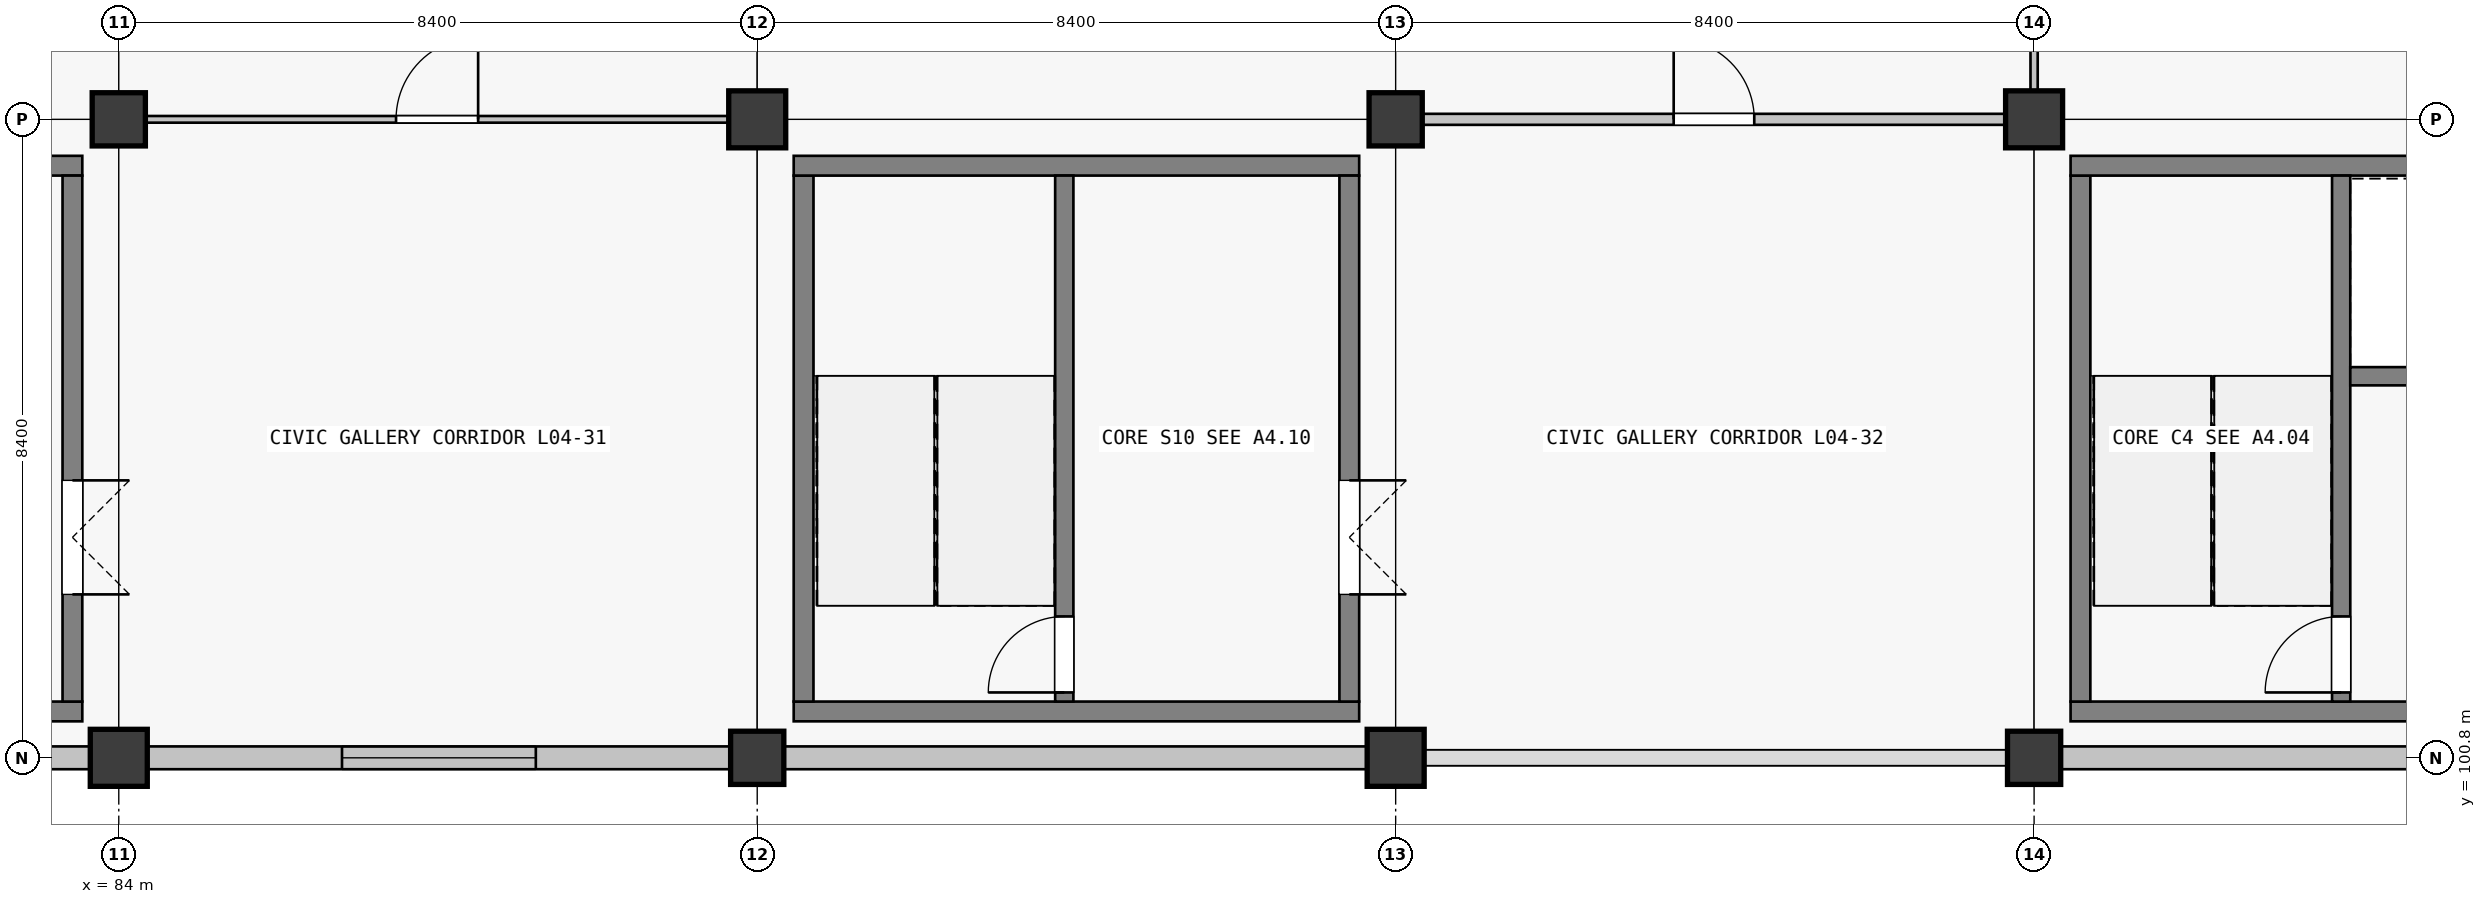
"""IFC4 building model, lengths in metres.
Left out: names, types, materials, properties, quantities, classifications, styles, units other than length and angle.
Written with IfcOpenShell. Run it as: python <this file> out.ifc"""

import sys

from ifc_helpers import new_model, si_unit, direction, frame, frame_2d, origin, origin_2d, place, context, subcontext, project, spatial, rectangle, extrude, element, fill, save


model = new_model("IFC4")
c1 = context("Model", 3, precision=1e-05, world=origin(), true_north=direction((0.0, 1.0)))
c2 = subcontext(c1, "Body", "Model", "MODEL_VIEW")
j1 = project(units=[si_unit("LENGTHUNIT", "METRE"), si_unit("PLANEANGLEUNIT", "RADIAN")], contexts=[c1])
p1 = place(None, origin())
s1 = spatial("IfcSite", under=j1, at=p1, CompositionType="ELEMENT")
p2 = place(p1, origin())
s2 = spatial("IfcBuilding", under=s1, at=p2, CompositionType="ELEMENT")
p3 = place(p2, frame((0.0, 0.0, 19.08)))
s3 = spatial("IfcBuildingStorey", under=s2, at=p3, CompositionType="ELEMENT", Elevation=19.08)
p4 = place(p3, frame((84.0, 100.8, 0.0), z_axis=(0.0, 0.0, 1.0), x_axis=(1.0, 0.0, 0.0)))
e1 = element("IfcColumn", 1, at=p4, inside=s3, PredefinedType="COLUMN", context=c2, shape_type="SweptSolid", body=[
    extrude(rectangle(XDim=0.75, YDim=0.75, at=origin_2d()), origin(), (0.0, 0.0, 1.0), 4.32),
])
for number, where, z_axis, x_axis in (
    (2, (84.0, 109.2, 0.0), (0.0, 0.0, 1.0), (1.0, 0.0, 0.0)),
    (3, (92.4, 100.8, 0.0), (0.0, 0.0, 1.0), (1.0, 0.0, 0.0)),
):
    element("IfcColumn", number, at=place(p3, frame(where, z_axis=z_axis, x_axis=x_axis)), inside=s3, PredefinedType="COLUMN", context=c2, shape_type="SweptSolid", body=[
        extrude(rectangle(XDim=0.7, YDim=0.7, at=origin_2d()), origin(), (0.0, 0.0, 1.0), 4.32),
    ])
for number, where, z_axis, x_axis in (
    (4, (92.4, 109.2, 0.0), (0.0, 0.0, 1.0), (1.0, 0.0, 0.0)),
    (5, (100.8, 100.8, 0.0), (0.0, 0.0, 1.0), (1.0, 0.0, 0.0)),
):
    element("IfcColumn", number, at=place(p3, frame(where, z_axis=z_axis, x_axis=x_axis)), inside=s3, PredefinedType="COLUMN", context=c2, shape_type="SweptSolid", body=[
        extrude(rectangle(XDim=0.75, YDim=0.75, at=origin_2d()), origin(), (0.0, 0.0, 1.0), 4.32),
    ])
for number, where, z_axis, x_axis in (
    (6, (100.8, 109.2, 0.0), (0.0, 0.0, 1.0), (1.0, 0.0, 0.0)),
    (7, (109.2, 100.8, 0.0), (0.0, 0.0, 1.0), (1.0, 0.0, 0.0)),
):
    element("IfcColumn", number, at=place(p3, frame(where, z_axis=z_axis, x_axis=x_axis)), inside=s3, PredefinedType="COLUMN", context=c2, shape_type="SweptSolid", body=[
        extrude(rectangle(XDim=0.7, YDim=0.7, at=origin_2d()), origin(), (0.0, 0.0, 1.0), 4.32),
    ])
p5 = place(p3, frame((109.2, 109.2, 0.0), z_axis=(0.0, 0.0, 1.0), x_axis=(1.0, 0.0, 0.0)))
e8 = element("IfcColumn", 8, at=p5, inside=s3, PredefinedType="COLUMN", context=c2, shape_type="SweptSolid", body=[
    extrude(rectangle(XDim=0.75, YDim=0.75, at=origin_2d()), origin(), (0.0, 0.0, 1.0), 4.32),
])
p6 = place(p3, frame((83.624, 100.8, 0.0), z_axis=(0.0, 0.0, 1.0), x_axis=(-1.0, 0.0, 0.0)))
e9 = element("IfcWall", 9, at=p6, inside=s3, PredefinedType="SOLIDWALL", context=c2, shape_type="SweptSolid", body=[
    extrude(rectangle(XDim=7.673, YDim=0.3, at=frame_2d((3.836, 0.0))), origin(), (0.0, 0.0, 1.0), 3.37),
])
p7 = place(p3, frame((92.049, 100.8, 0.0), z_axis=(0.0, 0.0, 1.0), x_axis=(-1.0, 0.0, 0.0)))
e10 = element("IfcWall", 10, at=p7, inside=s3, PredefinedType="SOLIDWALL", context=c2, shape_type="SweptSolid", body=[
    extrude(rectangle(XDim=7.673, YDim=0.3, at=frame_2d((3.836, 0.0))), origin(), (0.0, 0.0, 1.0), 3.37),
])
p8 = place(p7, frame((2.562, 0.0, 0.9)))
e11 = element("IfcOpeningElement", 11, at=p8, cuts=e10, PredefinedType="OPENING", context=c2, shape_type="SweptSolid", body=[
    extrude(rectangle(XDim=2.55, YDim=1.95, at=frame_2d((1.275, 0.975))), frame((0.0, 0.15, 0.0), z_axis=(0.0, -1.0, 0.0), x_axis=(1.0, 0.0, 0.0)), (0.0, 0.0, 1.0), 0.3),
])
for number, where, z_axis, x_axis in (
    (12, (100.424, 100.8, 0.0), (0.0, 0.0, 1.0), (-1.0, 0.0, 0.0)),
    (13, (117.224, 100.8, 0.0), (0.0, 0.0, 1.0), (-1.0, 0.0, 0.0)),
):
    element("IfcWall", number, at=place(p3, frame(where, z_axis=z_axis, x_axis=x_axis)), inside=s3, PredefinedType="SOLIDWALL", context=c2, shape_type="SweptSolid", body=[
        extrude(rectangle(XDim=7.673, YDim=0.3, at=frame_2d((3.836, 0.0))), origin(), (0.0, 0.0, 1.0), 3.37),
    ])
p9 = place(p3, frame((117.12, 101.41, 0.0), z_axis=(0.0, 0.0, 1.0), x_axis=(-1.0, 0.0, 0.0)))
e14 = element("IfcWall", 14, at=p9, inside=s3, PredefinedType="SHEAR", context=c2, shape_type="SweptSolid", body=[
    extrude(rectangle(XDim=7.44, YDim=0.26, at=frame_2d((3.72, 0.0))), origin(), (0.0, 0.0, 1.0), 4.32),
])
p10 = place(p3, frame((109.81, 101.54, 0.0), z_axis=(0.0, 0.0, 1.0), x_axis=(0.0, 1.0, 0.0)))
e15 = element("IfcWall", 15, at=p10, inside=s3, PredefinedType="SHEAR", context=c2, shape_type="SweptSolid", body=[
    extrude(rectangle(XDim=6.92, YDim=0.26, at=frame_2d((3.46, 0.0))), origin(), (0.0, 0.0, 1.0), 4.32),
])
p11 = place(p3, frame((109.68, 108.59, 0.0), z_axis=(0.0, 0.0, 1.0), x_axis=(1.0, 0.0, 0.0)))
e16 = element("IfcWall", 16, at=p11, inside=s3, PredefinedType="SHEAR", context=c2, shape_type="SweptSolid", body=[
    extrude(rectangle(XDim=7.44, YDim=0.26, at=frame_2d((3.72, 0.0))), origin(), (0.0, 0.0, 1.0), 4.32),
])
p12 = place(p3, frame((113.24, 101.54, 0.0), z_axis=(0.0, 0.0, 1.0), x_axis=(0.0, 1.0, 0.0)))
e17 = element("IfcWall", 17, at=p12, inside=s3, PredefinedType="SHEAR", context=c2, shape_type="SweptSolid", body=[
    extrude(rectangle(XDim=6.92, YDim=0.24, at=frame_2d((3.46, 0.0))), origin(), (0.0, 0.0, 1.0), 4.32),
])
p13 = place(p12, frame((0.12, 0.0, 0.0)))
e18 = element("IfcOpeningElement", 18, at=p13, cuts=e17, PredefinedType="OPENING", context=c2, shape_type="SweptSolid", body=[
    extrude(rectangle(XDim=1.0, YDim=2.15, at=frame_2d((0.5, 1.075))), frame((0.0, 0.12, 0.0), z_axis=(0.0, -1.0, 0.0), x_axis=(1.0, 0.0, 0.0)), (0.0, 0.0, 1.0), 0.24),
])
p14 = place(p3, frame((113.36, 105.82, 0.0), z_axis=(0.0, 0.0, 1.0), x_axis=(1.0, 0.0, 0.0)))
e19 = element("IfcWall", 19, at=p14, inside=s3, PredefinedType="SHEAR", context=c2, shape_type="SweptSolid", body=[
    extrude(rectangle(XDim=3.5, YDim=0.24, at=frame_2d((1.75, 0.0))), origin(), (0.0, 0.0, 1.0), 4.32),
])
p15 = place(p14, frame((1.15, 0.0, 0.0)))
e20 = element("IfcOpeningElement", 20, at=p15, cuts=e19, PredefinedType="OPENING", context=c2, shape_type="SweptSolid", body=[
    extrude(rectangle(XDim=1.2, YDim=2.2, at=frame_2d((0.6, 1.1))), frame((0.0, 0.12, 0.0), z_axis=(0.0, -1.0, 0.0), x_axis=(1.0, 0.0, 0.0)), (0.0, 0.0, 1.0), 0.24),
])
for number, where, z_axis, x_axis in (
    (21, (83.52, 101.41, 0.0), (0.0, 0.0, 1.0), (-1.0, 0.0, 0.0)),
    (22, (76.08, 108.59, 0.0), (0.0, 0.0, 1.0), (1.0, 0.0, 0.0)),
):
    element("IfcWall", number, at=place(p3, frame(where, z_axis=z_axis, x_axis=x_axis)), inside=s3, PredefinedType="SHEAR", context=c2, shape_type="SweptSolid", body=[
        extrude(rectangle(XDim=7.44, YDim=0.26, at=frame_2d((3.72, 0.0))), origin(), (0.0, 0.0, 1.0), 4.32),
    ])
p16 = place(p3, frame((83.39, 108.46, 0.0), z_axis=(0.0, 0.0, 1.0), x_axis=(0.0, -1.0, 0.0)))
e23 = element("IfcWall", 23, at=p16, inside=s3, PredefinedType="SHEAR", context=c2, shape_type="SweptSolid", body=[
    extrude(rectangle(XDim=6.92, YDim=0.26, at=frame_2d((3.46, 0.0))), origin(), (0.0, 0.0, 1.0), 4.32),
])
p17 = place(p16, frame((4.01, 0.0, 0.0)))
e24 = element("IfcOpeningElement", 24, at=p17, cuts=e23, PredefinedType="OPENING", context=c2, shape_type="SweptSolid", body=[
    extrude(rectangle(XDim=1.5, YDim=2.15, at=frame_2d((0.75, 1.075))), frame((0.0, 0.13, 0.0), z_axis=(0.0, -1.0, 0.0), x_axis=(1.0, 0.0, 0.0)), (0.0, 0.0, 1.0), 0.26),
])
p18 = place(p3, frame((100.32, 101.41, 0.0), z_axis=(0.0, 0.0, 1.0), x_axis=(-1.0, 0.0, 0.0)))
e25 = element("IfcWall", 25, at=p18, inside=s3, PredefinedType="SHEAR", context=c2, shape_type="SweptSolid", body=[
    extrude(rectangle(XDim=7.44, YDim=0.26, at=frame_2d((3.72, 0.0))), origin(), (0.0, 0.0, 1.0), 4.32),
])
p19 = place(p3, frame((93.01, 101.54, 0.0), z_axis=(0.0, 0.0, 1.0), x_axis=(0.0, 1.0, 0.0)))
e26 = element("IfcWall", 26, at=p19, inside=s3, PredefinedType="SHEAR", context=c2, shape_type="SweptSolid", body=[
    extrude(rectangle(XDim=6.92, YDim=0.26, at=frame_2d((3.46, 0.0))), origin(), (0.0, 0.0, 1.0), 4.32),
])
p20 = place(p3, frame((92.88, 108.59, 0.0), z_axis=(0.0, 0.0, 1.0), x_axis=(1.0, 0.0, 0.0)))
e27 = element("IfcWall", 27, at=p20, inside=s3, PredefinedType="SHEAR", context=c2, shape_type="SweptSolid", body=[
    extrude(rectangle(XDim=7.44, YDim=0.26, at=frame_2d((3.72, 0.0))), origin(), (0.0, 0.0, 1.0), 4.32),
])
p21 = place(p3, frame((100.19, 108.46, 0.0), z_axis=(0.0, 0.0, 1.0), x_axis=(0.0, -1.0, 0.0)))
e28 = element("IfcWall", 28, at=p21, inside=s3, PredefinedType="SHEAR", context=c2, shape_type="SweptSolid", body=[
    extrude(rectangle(XDim=6.92, YDim=0.26, at=frame_2d((3.46, 0.0))), origin(), (0.0, 0.0, 1.0), 4.32),
])
p22 = place(p21, frame((4.01, 0.0, 0.0)))
e29 = element("IfcOpeningElement", 29, at=p22, cuts=e28, PredefinedType="OPENING", context=c2, shape_type="SweptSolid", body=[
    extrude(rectangle(XDim=1.5, YDim=2.15, at=frame_2d((0.75, 1.075))), frame((0.0, 0.13, 0.0), z_axis=(0.0, -1.0, 0.0), x_axis=(1.0, 0.0, 0.0)), (0.0, 0.0, 1.0), 0.26),
])
p23 = place(p3, frame((96.44, 101.54, 0.0), z_axis=(0.0, 0.0, 1.0), x_axis=(0.0, 1.0, 0.0)))
e30 = element("IfcWall", 30, at=p23, inside=s3, PredefinedType="SHEAR", context=c2, shape_type="SweptSolid", body=[
    extrude(rectangle(XDim=6.92, YDim=0.24, at=frame_2d((3.46, 0.0))), origin(), (0.0, 0.0, 1.0), 4.32),
])
p24 = place(p23, frame((0.12, 0.0, 0.0)))
e31 = element("IfcOpeningElement", 31, at=p24, cuts=e30, PredefinedType="OPENING", context=c2, shape_type="SweptSolid", body=[
    extrude(rectangle(XDim=1.0, YDim=2.15, at=frame_2d((0.5, 1.075))), frame((0.0, 0.12, 0.0), z_axis=(0.0, -1.0, 0.0), x_axis=(1.0, 0.0, 0.0)), (0.0, 0.0, 1.0), 0.24),
])
p25 = place(p3, frame((84.352, 109.2, 0.0), z_axis=(0.0, 0.0, 1.0), x_axis=(1.0, 0.0, 0.0)))
e32 = element("IfcWall", 32, at=p25, inside=s3, PredefinedType="PARTITIONING", context=c2, shape_type="SweptSolid", body=[
    extrude(rectangle(XDim=7.671, YDim=0.088, at=frame_2d((3.835, 0.0))), origin(), (0.0, 0.0, 1.0), 3.19),
])
p26 = place(p25, frame((3.296, 0.0, 0.0)))
e33 = element("IfcOpeningElement", 33, at=p26, cuts=e32, PredefinedType="OPENING", context=c2, shape_type="SweptSolid", body=[
    extrude(rectangle(XDim=1.08, YDim=2.25, at=frame_2d((0.54, 1.125))), frame((0.0, 0.044, 0.0), z_axis=(0.0, -1.0, 0.0), x_axis=(1.0, 0.0, 0.0)), (0.0, 0.0, 1.0), 0.088),
])
p27 = place(p3, frame((101.152, 109.2, 0.0), z_axis=(0.0, 0.0, 1.0), x_axis=(1.0, 0.0, 0.0)))
e34 = element("IfcWall", 34, at=p27, inside=s3, PredefinedType="PARTITIONING", context=c2, shape_type="SweptSolid", body=[
    extrude(rectangle(XDim=7.671, YDim=0.145, at=frame_2d((3.835, 0.0))), origin(), (0.0, 0.0, 1.0), 3.19),
])
p28 = place(p27, frame((3.306, 0.0, 0.0)))
e35 = element("IfcOpeningElement", 35, at=p28, cuts=e34, PredefinedType="OPENING", context=c2, shape_type="SweptSolid", body=[
    extrude(rectangle(XDim=1.06, YDim=2.25, at=frame_2d((0.53, 1.125))), frame((0.0, 0.073, 0.0), z_axis=(0.0, -1.0, 0.0), x_axis=(1.0, 0.0, 0.0)), (0.0, 0.0, 1.0), 0.145),
])
p29 = place(p3, frame((109.2, 109.577, 0.0), z_axis=(0.0, 0.0, 1.0), x_axis=(0.0, 1.0, 0.0)))
e36 = element("IfcWall", 36, at=p29, inside=s3, PredefinedType="PARTITIONING", context=c2, shape_type="SweptSolid", body=[
    extrude(rectangle(XDim=7.721, YDim=0.095, at=frame_2d((3.861, 0.0))), origin(), (0.0, 0.0, 1.0), 3.19),
])
p30 = place(p29, frame((3.351, 0.0, 0.0)))
e37 = element("IfcOpeningElement", 37, at=p30, cuts=e36, PredefinedType="OPENING", context=c2, shape_type="SweptSolid", body=[
    extrude(rectangle(XDim=1.02, YDim=2.2, at=frame_2d((0.51, 1.1))), frame((0.0, 0.047, 0.0), z_axis=(0.0, -1.0, 0.0), x_axis=(1.0, 0.0, 0.0)), (0.0, 0.0, 1.0), 0.095),
])
p31 = place(p8, origin())
e38 = element("IfcWindow", 38, at=p31, inside=s3, PartitioningType="SINGLE_PANEL", PredefinedType="WINDOW", context=c2, shape_type="SweptSolid", body=[
    extrude(rectangle(XDim=2.55, YDim=1.95, at=frame_2d((1.275, 0.975))), frame((0.0, 0.03, 0.0), z_axis=(0.0, -1.0, 0.0), x_axis=(1.0, 0.0, 0.0)), (0.0, 0.0, 1.0), 0.06),
])
fill(e11, e38)
p32 = place(p13, origin())
e39 = element("IfcDoor", 39, at=p32, inside=s3, OperationType="SINGLE_SWING_LEFT", PredefinedType="DOOR", context=c2, shape_type="SweptSolid", body=[
    extrude(rectangle(XDim=1.0, YDim=2.15, at=frame_2d((0.5, 1.075))), frame((0.0, 0.025, 0.0), z_axis=(0.0, -1.0, 0.0), x_axis=(1.0, 0.0, 0.0)), (0.0, 0.0, 1.0), 0.05),
])
fill(e18, e39)
p33 = place(p17, origin())
e40 = element("IfcDoor", 40, at=p33, inside=s3, OperationType="DOUBLE_DOOR_SINGLE_SWING", PredefinedType="DOOR", context=c2, shape_type="SweptSolid", body=[
    extrude(rectangle(XDim=1.5, YDim=2.15, at=frame_2d((0.75, 1.075))), frame((0.0, 0.025, 0.0), z_axis=(0.0, -1.0, 0.0), x_axis=(1.0, 0.0, 0.0)), (0.0, 0.0, 1.0), 0.05),
])
fill(e24, e40)
p34 = place(p24, origin())
e41 = element("IfcDoor", 41, at=p34, inside=s3, OperationType="SINGLE_SWING_LEFT", PredefinedType="DOOR", context=c2, shape_type="SweptSolid", body=[
    extrude(rectangle(XDim=1.0, YDim=2.15, at=frame_2d((0.5, 1.075))), frame((0.0, 0.025, 0.0), z_axis=(0.0, -1.0, 0.0), x_axis=(1.0, 0.0, 0.0)), (0.0, 0.0, 1.0), 0.05),
])
fill(e31, e41)
p35 = place(p22, origin())
e42 = element("IfcDoor", 42, at=p35, inside=s3, OperationType="DOUBLE_DOOR_SINGLE_SWING", PredefinedType="DOOR", context=c2, shape_type="SweptSolid", body=[
    extrude(rectangle(XDim=1.5, YDim=2.15, at=frame_2d((0.75, 1.075))), frame((0.0, 0.025, 0.0), z_axis=(0.0, -1.0, 0.0), x_axis=(1.0, 0.0, 0.0)), (0.0, 0.0, 1.0), 0.05),
])
fill(e29, e42)
p36 = place(p26, origin())
e43 = element("IfcDoor", 43, at=p36, inside=s3, OperationType="SINGLE_SWING_RIGHT", PredefinedType="DOOR", context=c2, shape_type="SweptSolid", body=[
    extrude(rectangle(XDim=1.08, YDim=2.25, at=frame_2d((0.54, 1.125))), frame((0.0, 0.025, 0.0), z_axis=(0.0, -1.0, 0.0), x_axis=(1.0, 0.0, 0.0)), (0.0, 0.0, 1.0), 0.05),
])
fill(e33, e43)
p37 = place(p28, origin())
e44 = element("IfcDoor", 44, at=p37, inside=s3, OperationType="SINGLE_SWING_LEFT", PredefinedType="DOOR", context=c2, shape_type="SweptSolid", body=[
    extrude(rectangle(XDim=1.06, YDim=2.25, at=frame_2d((0.53, 1.125))), frame((0.0, 0.025, 0.0), z_axis=(0.0, -1.0, 0.0), x_axis=(1.0, 0.0, 0.0)), (0.0, 0.0, 1.0), 0.05),
])
fill(e35, e44)
save(model, sys.argv[1])
